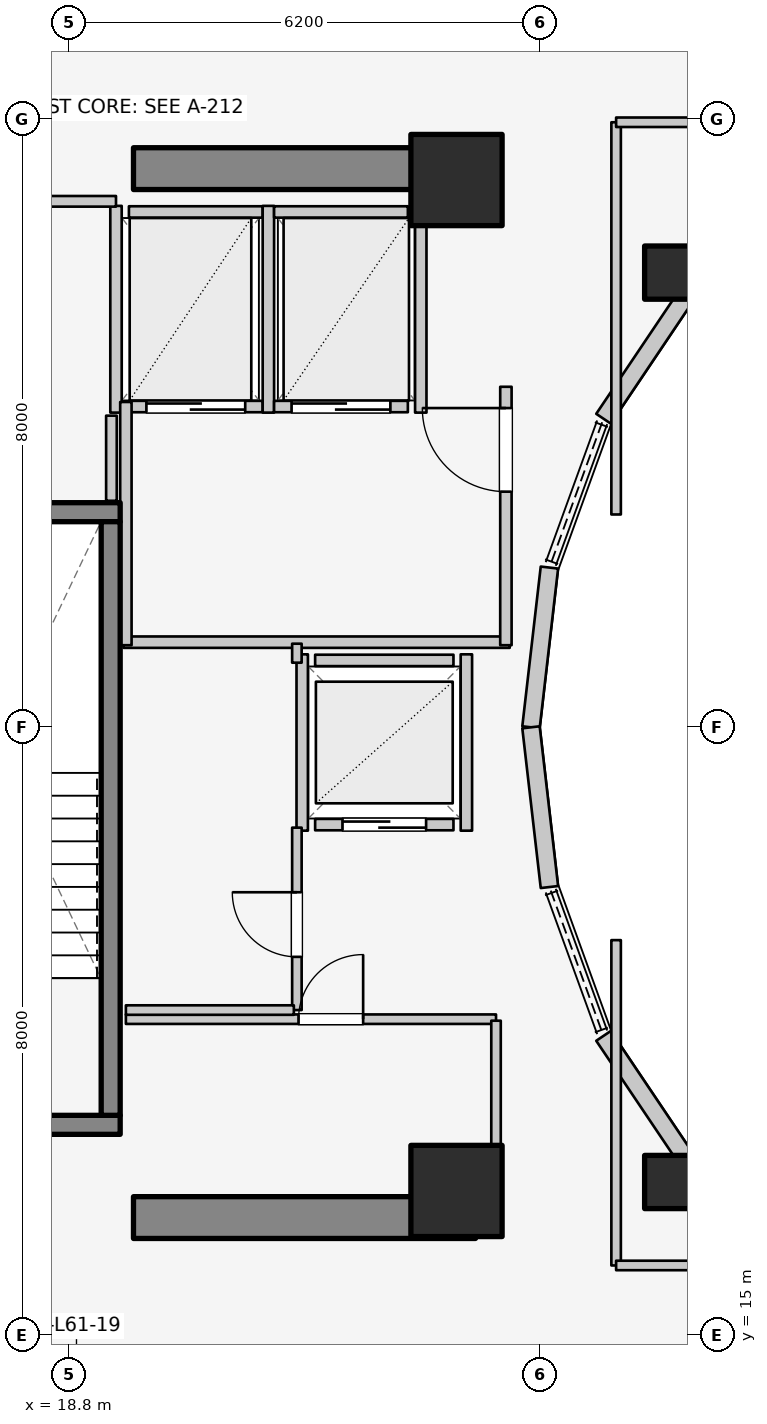
"""IFC4 building model, lengths in metres.
Left out: names, types, materials, properties, quantities, classifications, styles, units other than length and angle.
Written with IfcOpenShell. Run it as: python <this file> out.ifc"""

import sys

from ifc_helpers import new_model, si_unit, direction, frame, frame_2d, origin, origin_2d, place, context, subcontext, project, spatial, rectangle, extrude, element, fill, save


model = new_model("IFC4")
c1 = context("Model", 3, precision=1e-05, world=origin(), true_north=direction((0.0, 1.0)))
c2 = subcontext(c1, "Body", "Model", "MODEL_VIEW")
j1 = project(units=[si_unit("LENGTHUNIT", "METRE"), si_unit("PLANEANGLEUNIT", "RADIAN")], contexts=[c1])
p1 = place(None, origin())
s1 = spatial("IfcSite", under=j1, at=p1, CompositionType="ELEMENT")
p2 = place(p1, origin())
s2 = spatial("IfcBuilding", under=s1, at=p2, CompositionType="ELEMENT")
p3 = place(p2, frame((0.0, 0.0, 201.6)))
s3 = spatial("IfcBuildingStorey", under=s2, at=p3, CompositionType="ELEMENT", Elevation=201.6)
for number, where, z_axis, x_axis in (
    (1, (19.65, 16.55, 0.0), (0.0, 0.0, 1.0), (1.0, 0.0, 0.0)),
    (2, (19.65, 30.35, 0.0), (0.0, 0.0, 1.0), (1.0, 0.0, 0.0)),
):
    element("IfcWall", number, at=place(p3, frame(where, z_axis=z_axis, x_axis=x_axis)), inside=s3, PredefinedType="SHEAR", context=c2, shape_type="SweptSolid", body=[
        extrude(rectangle(XDim=4.5, YDim=0.55, at=frame_2d((2.25, 0.0))), origin(), (0.0, 0.0, 1.0), 3.1),
    ])
p4 = place(p3, frame((16.105, 17.77, 0.0), z_axis=(0.0, 0.0, 1.0), x_axis=(1.0, 0.0, 0.0)))
e3 = element("IfcWall", 3, at=p4, inside=s3, PredefinedType="SOLIDWALL", context=c2, shape_type="SweptSolid", body=[
    extrude(rectangle(XDim=3.37, YDim=0.25, at=frame_2d((1.685, 0.0))), origin(), (0.0, 0.0, 1.0), 3.1),
])
p5 = place(p4, frame((1.135, 0.0, 0.0)))
e4 = element("IfcOpeningElement", 4, at=p5, cuts=e3, PredefinedType="OPENING", context=c2, shape_type="SweptSolid", body=[
    extrude(rectangle(XDim=1.1, YDim=2.1, at=frame_2d((0.55, 1.05))), frame((0.0, 0.135, 0.0), z_axis=(0.0, -1.0, 0.0), x_axis=(1.0, 0.0, 0.0)), (0.0, 0.0, 1.0), 0.27),
])
p6 = place(p3, frame((16.105, 25.83, 0.0), z_axis=(0.0, 0.0, 1.0), x_axis=(1.0, 0.0, 0.0)))
e5 = element("IfcWall", 5, at=p6, inside=s3, PredefinedType="SOLIDWALL", context=c2, shape_type="SweptSolid", body=[
    extrude(rectangle(XDim=3.37, YDim=0.25, at=frame_2d((1.685, 0.0))), origin(), (0.0, 0.0, 1.0), 3.1),
])
p7 = place(p3, frame((19.35, 17.895, 0.0), z_axis=(0.0, 0.0, 1.0), x_axis=(0.0, 1.0, 0.0)))
e6 = element("IfcWall", 6, at=p7, inside=s3, PredefinedType="SOLIDWALL", context=c2, shape_type="SweptSolid", body=[
    extrude(rectangle(XDim=7.81, YDim=0.25, at=frame_2d((3.905, 0.0))), origin(), (0.0, 0.0, 1.0), 3.1),
])
for number, where, z_axis, x_axis in (
    (7, (23.9, 16.9, 0.0), (0.0, 0.0, 1.0), (1.0, 0.0, 0.0)),
    (8, (23.9, 30.2, 0.0), (0.0, 0.0, 1.0), (1.0, 0.0, 0.0)),
):
    element("IfcColumn", number, at=place(p3, frame(where, z_axis=z_axis, x_axis=x_axis)), inside=s3, PredefinedType="COLUMN", context=c2, shape_type="SweptSolid", body=[
        extrude(rectangle(XDim=1.2, YDim=1.2, at=origin_2d()), origin(), (0.0, 0.0, 1.0), 3.1),
    ])
for number, where, z_axis, x_axis in (
    (9, (26.725, 28.982, 0.0), (0.0, 0.0, 1.0), (1.0, 0.0, 0.0)),
    (10, (26.725, 17.018, 0.0), (0.0, 0.0, 1.0), (1.0, 0.0, 0.0)),
):
    element("IfcColumn", number, at=place(p3, frame(where, z_axis=z_axis, x_axis=x_axis)), inside=s3, PredefinedType="COLUMN", context=c2, shape_type="SweptSolid", body=[
        extrude(rectangle(XDim=0.7, YDim=0.7, at=origin_2d()), origin(), (0.0, 0.0, 1.0), 3.1),
    ])
p8 = place(p3, frame((28.44, 30.032, 0.0), z_axis=(0.0, 0.0, 1.0), x_axis=(-0.752576694707, -0.658504607869, 0.0)))
e11 = element("IfcWall", 11, at=p8, inside=s3, PredefinedType="STANDARD", context=c2, shape_type="SweptSolid", body=[
    extrude(rectangle(XDim=1.959, YDim=0.23, at=frame_2d((0.98, 0.0))), origin(), (0.0, 0.0, 1.0), 2.16),
])
p9 = place(p3, frame((26.965, 28.742, 0.0), z_axis=(0.0, 0.0, 1.0), x_axis=(-0.558197800898, -0.829707909492, 0.0)))
e12 = element("IfcWall", 12, at=p9, inside=s3, PredefinedType="STANDARD", context=c2, shape_type="SweptSolid", body=[
    extrude(rectangle(XDim=2.027, YDim=0.23, at=frame_2d((1.013, 0.0))), origin(), (0.0, 0.0, 1.0), 2.16),
])
for number, where, z_axis, x_axis in (
    (13, (25.123, 25.102, 0.0), (0.0, 0.0, 1.0), (-0.115, -0.993, 0.0)),
    (14, (24.88, 23.0, 0.0), (0.0, 0.0, 1.0), (0.115, -0.993, 0.0)),
):
    element("IfcWall", number, at=place(p3, frame(where, z_axis=z_axis, x_axis=x_axis)), inside=s3, PredefinedType="STANDARD", context=c2, shape_type="SweptSolid", body=[
        extrude(rectangle(XDim=2.115, YDim=0.23, at=frame_2d((1.058, 0.0))), origin(), (0.0, 0.0, 1.0), 2.84),
    ])
p10 = place(p3, frame((25.834, 18.94, 0.0), z_axis=(0.0, 0.0, 1.0), x_axis=(0.558197800898, -0.829707909492, 0.0)))
e15 = element("IfcWall", 15, at=p10, inside=s3, PredefinedType="STANDARD", context=c2, shape_type="SweptSolid", body=[
    extrude(rectangle(XDim=2.027, YDim=0.23, at=frame_2d((1.013, 0.0))), origin(), (0.0, 0.0, 1.0), 2.16),
])
p11 = place(p3, frame((26.965, 17.258, 0.0), z_axis=(0.0, 0.0, 1.0), x_axis=(0.752576694707, -0.658504607869, 0.0)))
e16 = element("IfcWall", 16, at=p11, inside=s3, PredefinedType="STANDARD", context=c2, shape_type="SweptSolid", body=[
    extrude(rectangle(XDim=1.959, YDim=0.23, at=frame_2d((0.98, 0.0))), origin(), (0.0, 0.0, 1.0), 2.16),
])
p12 = place(p3, frame((22.04, 21.72, 0.0), z_axis=(0.0, 0.0, 1.0), x_axis=(1.0, 0.0, 0.0)))
e17 = element("IfcWall", 17, at=p12, inside=s3, PredefinedType="SOLIDWALL", context=c2, shape_type="SweptSolid", body=[
    extrude(rectangle(XDim=1.82, YDim=0.15, at=frame_2d((0.91, 0.0))), origin(), (0.0, 0.0, 1.0), 2.12),
])
p13 = place(p12, frame((0.36, 0.0, 0.0)))
e18 = element("IfcOpeningElement", 18, at=p13, cuts=e17, PredefinedType="OPENING", context=c2, shape_type="SweptSolid", body=[
    extrude(rectangle(XDim=1.1, YDim=2.1, at=frame_2d((0.55, 1.05))), frame((0.0, 0.085, 0.0), z_axis=(0.0, -1.0, 0.0), x_axis=(1.0, 0.0, 0.0)), (0.0, 0.0, 1.0), 0.17),
])
p14 = place(p3, frame((22.04, 23.88, 0.0), z_axis=(0.0, 0.0, 1.0), x_axis=(1.0, 0.0, 0.0)))
e19 = element("IfcWall", 19, at=p14, inside=s3, PredefinedType="SOLIDWALL", context=c2, shape_type="SweptSolid", body=[
    extrude(rectangle(XDim=1.82, YDim=0.15, at=frame_2d((0.91, 0.0))), origin(), (0.0, 0.0, 1.0), 2.12),
])
p15 = place(p3, frame((21.87, 21.64, 0.0), z_axis=(0.0, 0.0, 1.0), x_axis=(0.0, 1.0, 0.0)))
e20 = element("IfcWall", 20, at=p15, inside=s3, PredefinedType="SOLIDWALL", context=c2, shape_type="SweptSolid", body=[
    extrude(rectangle(XDim=2.32, YDim=0.15, at=frame_2d((1.16, 0.0))), origin(), (0.0, 0.0, 1.0), 2.855),
])
p16 = place(p3, frame((24.03, 21.64, 0.0), z_axis=(0.0, 0.0, 1.0), x_axis=(0.0, 1.0, 0.0)))
e21 = element("IfcWall", 21, at=p16, inside=s3, PredefinedType="SOLIDWALL", context=c2, shape_type="SweptSolid", body=[
    extrude(rectangle(XDim=2.32, YDim=0.15, at=frame_2d((1.16, 0.0))), origin(), (0.0, 0.0, 1.0), 2.12),
])
p17 = place(p3, frame((19.59, 27.22, 0.0), z_axis=(0.0, 0.0, 1.0), x_axis=(1.0, 0.0, 0.0)))
e22 = element("IfcWall", 22, at=p17, inside=s3, PredefinedType="SOLIDWALL", context=c2, shape_type="SweptSolid", body=[
    extrude(rectangle(XDim=1.76, YDim=0.15, at=frame_2d((0.88, 0.0))), origin(), (0.0, 0.0, 1.0), 2.855),
])
p18 = place(p17, frame((0.23, 0.0, 0.0)))
e23 = element("IfcOpeningElement", 23, at=p18, cuts=e22, PredefinedType="OPENING", context=c2, shape_type="SweptSolid", body=[
    extrude(rectangle(XDim=1.3, YDim=2.1, at=frame_2d((0.65, 1.05))), frame((0.0, 0.085, 0.0), z_axis=(0.0, -1.0, 0.0), x_axis=(1.0, 0.0, 0.0)), (0.0, 0.0, 1.0), 0.17),
])
p19 = place(p3, frame((19.59, 29.78, 0.0), z_axis=(0.0, 0.0, 1.0), x_axis=(1.0, 0.0, 0.0)))
e24 = element("IfcWall", 24, at=p19, inside=s3, PredefinedType="SOLIDWALL", context=c2, shape_type="SweptSolid", body=[
    extrude(rectangle(XDim=1.76, YDim=0.15, at=frame_2d((0.88, 0.0))), origin(), (0.0, 0.0, 1.0), 2.855),
])
for number, where, z_axis, x_axis in (
    (25, (19.42, 27.14, 0.0), (0.0, 0.0, 1.0), (0.0, 1.0, 0.0)),
    (26, (21.425, 27.14, 0.0), (0.0, 0.0, 1.0), (0.0, 1.0, 0.0)),
):
    element("IfcWall", number, at=place(p3, frame(where, z_axis=z_axis, x_axis=x_axis)), inside=s3, PredefinedType="SOLIDWALL", context=c2, shape_type="SweptSolid", body=[
        extrude(rectangle(XDim=2.72, YDim=0.15, at=frame_2d((1.36, 0.0))), origin(), (0.0, 0.0, 1.0), 2.855),
    ])
p20 = place(p3, frame((21.5, 27.22, 0.0), z_axis=(0.0, 0.0, 1.0), x_axis=(1.0, 0.0, 0.0)))
e27 = element("IfcWall", 27, at=p20, inside=s3, PredefinedType="SOLIDWALL", context=c2, shape_type="SweptSolid", body=[
    extrude(rectangle(XDim=1.76, YDim=0.15, at=frame_2d((0.88, 0.0))), origin(), (0.0, 0.0, 1.0), 2.855),
])
p21 = place(p20, frame((0.23, 0.0, 0.0)))
e28 = element("IfcOpeningElement", 28, at=p21, cuts=e27, PredefinedType="OPENING", context=c2, shape_type="SweptSolid", body=[
    extrude(rectangle(XDim=1.3, YDim=2.1, at=frame_2d((0.65, 1.05))), frame((0.0, 0.085, 0.0), z_axis=(0.0, -1.0, 0.0), x_axis=(1.0, 0.0, 0.0)), (0.0, 0.0, 1.0), 0.17),
])
p22 = place(p3, frame((21.5, 29.78, 0.0), z_axis=(0.0, 0.0, 1.0), x_axis=(1.0, 0.0, 0.0)))
e29 = element("IfcWall", 29, at=p22, inside=s3, PredefinedType="SOLIDWALL", context=c2, shape_type="SweptSolid", body=[
    extrude(rectangle(XDim=1.76, YDim=0.15, at=frame_2d((0.88, 0.0))), origin(), (0.0, 0.0, 1.0), 2.855),
])
p23 = place(p3, frame((23.43, 27.14, 0.0), z_axis=(0.0, 0.0, 1.0), x_axis=(0.0, 1.0, 0.0)))
e30 = element("IfcWall", 30, at=p23, inside=s3, PredefinedType="SOLIDWALL", context=c2, shape_type="SweptSolid", body=[
    extrude(rectangle(XDim=2.72, YDim=0.15, at=frame_2d((1.36, 0.0))), origin(), (0.0, 0.0, 1.0), 2.855),
])
p24 = place(p3, frame((19.52, 24.12, 0.0), z_axis=(0.0, 0.0, 1.0), x_axis=(1.0, 0.0, 0.0)))
e31 = element("IfcWall", 31, at=p24, inside=s3, PredefinedType="PARTITIONING", context=c2, shape_type="SweptSolid", body=[
    extrude(rectangle(XDim=5.08, YDim=0.15, at=frame_2d((2.54, 0.0))), origin(), (0.0, 0.0, 1.0), 2.12),
])
p25 = place(p3, frame((19.55, 24.08, 0.0), z_axis=(0.0, 0.0, 1.0), x_axis=(0.0, 1.0, 0.0)))
e32 = element("IfcWall", 32, at=p25, inside=s3, PredefinedType="PARTITIONING", context=c2, shape_type="SweptSolid", body=[
    extrude(rectangle(XDim=3.2, YDim=0.15, at=frame_2d((1.6, 0.0))), origin(), (0.0, 0.0, 1.0), 2.855),
])
p26 = place(p3, frame((24.55, 24.08, 0.0), z_axis=(0.0, 0.0, 1.0), x_axis=(0.0, 1.0, 0.0)))
e33 = element("IfcWall", 33, at=p26, inside=s3, PredefinedType="PARTITIONING", context=c2, shape_type="SweptSolid", body=[
    extrude(rectangle(XDim=3.4, YDim=0.15, at=frame_2d((1.7, 0.0))), origin(), (0.0, 0.0, 1.0), 2.855),
])
p27 = place(p26, frame((2.02, 0.0, 0.0)))
e34 = element("IfcOpeningElement", 34, at=p27, cuts=e33, PredefinedType="OPENING", context=c2, shape_type="SweptSolid", body=[
    extrude(rectangle(XDim=1.1, YDim=2.1, at=frame_2d((0.55, 1.05))), frame((0.0, 0.085, 0.0), z_axis=(0.0, -1.0, 0.0), x_axis=(1.0, 0.0, 0.0)), (0.0, 0.0, 1.0), 0.17),
])
p28 = place(p3, frame((19.55, 19.16, 0.0), z_axis=(0.0, 0.0, 1.0), x_axis=(1.0, 0.0, 0.0)))
e35 = element("IfcWall", 35, at=p28, inside=s3, PredefinedType="PARTITIONING", context=c2, shape_type="SweptSolid", body=[
    extrude(rectangle(XDim=4.87, YDim=0.125, at=frame_2d((2.435, 0.0))), origin(), (0.0, 0.0, 1.0), 2.12),
])
p29 = place(p28, frame((2.272, 0.0, 0.0)))
e36 = element("IfcOpeningElement", 36, at=p29, cuts=e35, PredefinedType="OPENING", context=c2, shape_type="SweptSolid", body=[
    extrude(rectangle(XDim=0.85, YDim=2.05, at=frame_2d((0.425, 1.025))), frame((0.0, 0.073, 0.0), z_axis=(0.0, -1.0, 0.0), x_axis=(1.0, 0.0, 0.0)), (0.0, 0.0, 1.0), 0.145),
])
p30 = place(p3, frame((24.42, 17.1, 0.0), z_axis=(0.0, 0.0, 1.0), x_axis=(0.0, 1.0, 0.0)))
e37 = element("IfcWall", 37, at=p30, inside=s3, PredefinedType="PARTITIONING", context=c2, shape_type="SweptSolid", body=[
    extrude(rectangle(XDim=2.04, YDim=0.125, at=frame_2d((1.02, 0.0))), origin(), (0.0, 0.0, 1.0), 2.232),
])
p31 = place(p3, frame((21.8, 19.28, 0.0), z_axis=(0.0, 0.0, 1.0), x_axis=(0.0, 1.0, 0.0)))
e38 = element("IfcWall", 38, at=p31, inside=s3, PredefinedType="PARTITIONING", context=c2, shape_type="SweptSolid", body=[
    extrude(rectangle(XDim=2.4, YDim=0.125, at=frame_2d((1.2, 0.0))), origin(), (0.0, 0.0, 1.0), 2.855),
])
p32 = place(p31, frame((0.7, 0.0, 0.0)))
e39 = element("IfcOpeningElement", 39, at=p32, cuts=e38, PredefinedType="OPENING", context=c2, shape_type="SweptSolid", body=[
    extrude(rectangle(XDim=0.85, YDim=2.05, at=frame_2d((0.425, 1.025))), frame((0.0, 0.073, 0.0), z_axis=(0.0, -1.0, 0.0), x_axis=(1.0, 0.0, 0.0)), (0.0, 0.0, 1.0), 0.145),
])
p33 = place(p3, frame((21.8, 23.85, 0.0), z_axis=(0.0, 0.0, 1.0), x_axis=(0.0, 1.0, 0.0)))
e40 = element("IfcWall", 40, at=p33, inside=s3, PredefinedType="PARTITIONING", context=c2, shape_type="SweptSolid", body=[
    extrude(rectangle(XDim=0.25, YDim=0.125, at=frame_2d((0.125, 0.0))), origin(), (0.0, 0.0, 1.0), 2.855),
])
p34 = place(p3, frame((19.55, 19.28, 0.0), z_axis=(0.0, 0.0, 1.0), x_axis=(1.0, 0.0, 0.0)))
e41 = element("IfcWall", 41, at=p34, inside=s3, PredefinedType="PARTITIONING", context=c2, shape_type="SweptSolid", body=[
    extrude(rectangle(XDim=2.21, YDim=0.125, at=frame_2d((1.105, 0.0))), origin(), (0.0, 0.0, 1.0), 2.12),
])
p35 = place(p3, frame((16.12, 29.92, 0.0), z_axis=(0.0, 0.0, 1.0), x_axis=(1.0, 0.0, 0.0)))
e42 = element("IfcWall", 42, at=p35, inside=s3, PredefinedType="PLUMBINGWALL", context=c2, shape_type="SweptSolid", body=[
    extrude(rectangle(XDim=3.3, YDim=0.14, at=frame_2d((1.65, 0.0))), origin(), (0.0, 0.0, 1.0), 2.855),
])
p36 = place(p35, frame((1.399, 0.0, 0.0)))
e43 = element("IfcOpeningElement", 43, at=p36, cuts=e42, PredefinedType="OPENING", context=c2, shape_type="SweptSolid", body=[
    extrude(rectangle(XDim=0.85, YDim=2.05, at=frame_2d((0.425, 1.025))), frame((0.0, 0.08, 0.0), z_axis=(0.0, -1.0, 0.0), x_axis=(1.0, 0.0, 0.0)), (0.0, 0.0, 1.0), 0.16),
])
p37 = place(p3, frame((19.36, 25.98, 0.0), z_axis=(0.0, 0.0, 1.0), x_axis=(0.0, 1.0, 0.0)))
e44 = element("IfcWall", 44, at=p37, inside=s3, PredefinedType="PLUMBINGWALL", context=c2, shape_type="SweptSolid", body=[
    extrude(rectangle(XDim=1.12, YDim=0.14, at=frame_2d((0.56, 0.0))), origin(), (0.0, 0.0, 1.0), 2.855),
])
p38 = place(p3, frame((28.45, 30.015, 0.0), z_axis=(0.0, 0.0, 1.0), x_axis=(-0.523992004803, 0.851723182086, 0.0)))
e45 = element("IfcWall", 45, at=p38, inside=s3, PredefinedType="PARTITIONING", context=c2, shape_type="SweptSolid", body=[
    extrude(rectangle(XDim=3.101, YDim=0.125, at=frame_2d((1.551, 0.0))), origin(), (0.0, 0.0, 1.0), 2.376),
])
p39 = place(p3, frame((26.0, 25.8, 0.0), z_axis=(0.0, 0.0, 1.0), x_axis=(0.0, 1.0, 0.0)))
e46 = element("IfcWall", 46, at=p39, inside=s3, PredefinedType="PARTITIONING", context=c2, shape_type="SweptSolid", body=[
    extrude(rectangle(XDim=5.16, YDim=0.125, at=frame_2d((2.58, 0.0))), origin(), (0.0, 0.0, 1.0), 2.232),
])
p40 = place(p3, frame((26.0, 30.96, 0.0), z_axis=(0.0, 0.0, 1.0), x_axis=(1.0, 0.0, 0.0)))
e47 = element("IfcWall", 47, at=p40, inside=s3, PredefinedType="PARTITIONING", context=c2, shape_type="SweptSolid", body=[
    extrude(rectangle(XDim=2.6, YDim=0.125, at=frame_2d((1.3, 0.0))), origin(), (0.0, 0.0, 1.0), 2.376),
])
p41 = place(p3, frame((26.0, 15.92, 0.0), z_axis=(0.0, 0.0, 1.0), x_axis=(0.0, 1.0, 0.0)))
e48 = element("IfcWall", 48, at=p41, inside=s3, PredefinedType="PARTITIONING", context=c2, shape_type="SweptSolid", body=[
    extrude(rectangle(XDim=4.28, YDim=0.125, at=frame_2d((2.14, 0.0))), origin(), (0.0, 0.0, 1.0), 2.232),
])
p42 = place(p3, frame((26.0, 15.92, 0.0), z_axis=(0.0, 0.0, 1.0), x_axis=(1.0, 0.0, 0.0)))
e49 = element("IfcWall", 49, at=p42, inside=s3, PredefinedType="PARTITIONING", context=c2, shape_type="SweptSolid", body=[
    extrude(rectangle(XDim=2.6, YDim=0.125, at=frame_2d((1.3, 0.0))), origin(), (0.0, 0.0, 1.0), 2.232),
])
p43 = place(p13, origin())
e50 = element("IfcDoor", 50, at=p43, inside=s3, OperationType="DOUBLE_DOOR_SLIDING", PredefinedType="DOOR", context=c2, shape_type="SweptSolid", body=[
    extrude(rectangle(XDim=1.1, YDim=2.1, at=frame_2d((0.55, 1.05))), frame((0.0, 0.025, 0.0), z_axis=(0.0, -1.0, 0.0), x_axis=(1.0, 0.0, 0.0)), (0.0, 0.0, 1.0), 0.05),
])
fill(e18, e50)
p44 = place(p18, origin())
e51 = element("IfcDoor", 51, at=p44, inside=s3, OperationType="DOUBLE_DOOR_SLIDING", PredefinedType="DOOR", context=c2, shape_type="SweptSolid", body=[
    extrude(rectangle(XDim=1.3, YDim=2.1, at=frame_2d((0.65, 1.05))), frame((0.0, 0.025, 0.0), z_axis=(0.0, -1.0, 0.0), x_axis=(1.0, 0.0, 0.0)), (0.0, 0.0, 1.0), 0.05),
])
fill(e23, e51)
p45 = place(p21, origin())
e52 = element("IfcDoor", 52, at=p45, inside=s3, OperationType="DOUBLE_DOOR_SLIDING", PredefinedType="DOOR", context=c2, shape_type="SweptSolid", body=[
    extrude(rectangle(XDim=1.3, YDim=2.1, at=frame_2d((0.65, 1.05))), frame((0.0, 0.025, 0.0), z_axis=(0.0, -1.0, 0.0), x_axis=(1.0, 0.0, 0.0)), (0.0, 0.0, 1.0), 0.05),
])
fill(e28, e52)
p46 = place(p27, origin())
e53 = element("IfcDoor", 53, at=p46, inside=s3, OperationType="SINGLE_SWING_RIGHT", PredefinedType="DOOR", context=c2, shape_type="SweptSolid", body=[
    extrude(rectangle(XDim=1.1, YDim=2.1, at=frame_2d((0.55, 1.05))), frame((0.0, 0.025, 0.0), z_axis=(0.0, -1.0, 0.0), x_axis=(1.0, 0.0, 0.0)), (0.0, 0.0, 1.0), 0.05),
])
fill(e34, e53)
p47 = place(p29, origin())
e54 = element("IfcDoor", 54, at=p47, inside=s3, OperationType="SINGLE_SWING_RIGHT", PredefinedType="DOOR", context=c2, shape_type="SweptSolid", body=[
    extrude(rectangle(XDim=0.85, YDim=2.05, at=frame_2d((0.425, 1.025))), frame((0.0, 0.025, 0.0), z_axis=(0.0, -1.0, 0.0), x_axis=(1.0, 0.0, 0.0)), (0.0, 0.0, 1.0), 0.05),
])
fill(e36, e54)
p48 = place(p32, origin())
e55 = element("IfcDoor", 55, at=p48, inside=s3, OperationType="SINGLE_SWING_RIGHT", PredefinedType="DOOR", context=c2, shape_type="SweptSolid", body=[
    extrude(rectangle(XDim=0.85, YDim=2.05, at=frame_2d((0.425, 1.025))), frame((0.0, 0.025, 0.0), z_axis=(0.0, -1.0, 0.0), x_axis=(1.0, 0.0, 0.0)), (0.0, 0.0, 1.0), 0.05),
])
fill(e39, e55)
save(model, sys.argv[1])
